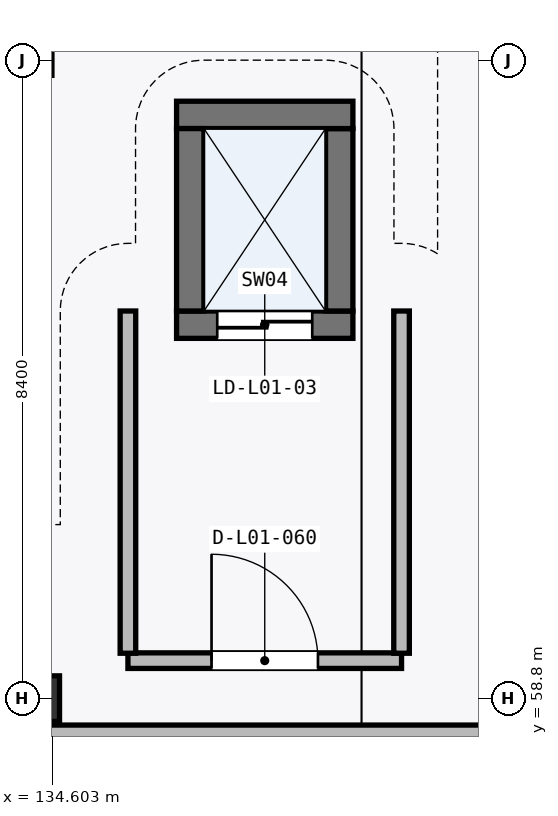
"""IFC4 building model, lengths in metres.
Left out: names, types, materials, properties, quantities, classifications, styles, units other than length and angle.
Written with IfcOpenShell. Run it as: python <this file> out.ifc"""

import sys

from ifc_helpers import new_model, si_unit, direction, frame, frame_2d, origin, origin_2d, place, context, subcontext, project, spatial, rectangle, hollow_rectangle, extrude, element, fill, save


model = new_model("IFC4")
c1 = context("Model", 3, precision=1e-05, world=origin(), true_north=direction((0.0, 1.0)))
c2 = subcontext(c1, "Body", "Model", "MODEL_VIEW")
j1 = project(units=[si_unit("LENGTHUNIT", "METRE"), si_unit("PLANEANGLEUNIT", "RADIAN")], contexts=[c1])
p1 = place(None, origin())
s1 = spatial("IfcSite", under=j1, at=p1, CompositionType="ELEMENT")
p2 = place(p1, origin())
s2 = spatial("IfcBuilding", under=s1, at=p2, CompositionType="ELEMENT")
p3 = place(p2, origin())
s3 = spatial("IfcBuildingStorey", under=s2, at=p3, CompositionType="ELEMENT", Elevation=0.0)
p4 = place(p3, frame((134.4, 58.8, 0.0), z_axis=(0.0, 0.0, 1.0), x_axis=(1.0, 0.0, 0.0)))
e1 = element("IfcColumn", 1, at=p4, inside=s3, PredefinedType="COLUMN", context=c2, shape_type="SweptSolid", body=[
    extrude(hollow_rectangle(XDim=0.6, YDim=0.6, WallThickness=0.024, at=origin_2d()), origin(), (0.0, 0.0, 1.0), 6.0),
])
p5 = place(p3, frame((136.24, 63.72, 0.0), z_axis=(0.0, 0.0, 1.0), x_axis=(1.0, 0.0, 0.0)))
e2 = element("IfcWall", 2, at=p5, inside=s3, PredefinedType="SHEAR", context=c2, shape_type="SweptSolid", body=[
    extrude(rectangle(XDim=2.32, YDim=0.36, at=frame_2d((1.16, 0.0))), origin(), (0.0, 0.0, 1.0), 5.745),
])
p6 = place(p5, frame((0.535, 0.0, 0.0)))
e3 = element("IfcOpeningElement", 3, at=p6, cuts=e2, PredefinedType="OPENING", context=c2, shape_type="SweptSolid", body=[
    extrude(rectangle(XDim=1.25, YDim=2.2, at=frame_2d((0.625, 1.1))), frame((0.0, 0.19, 0.0), z_axis=(0.0, -1.0, 0.0), x_axis=(1.0, 0.0, 0.0)), (0.0, 0.0, 1.0), 0.38),
])
p7 = place(p3, frame((138.38, 63.9, 0.0), z_axis=(0.0, 0.0, 1.0), x_axis=(0.0, 1.0, 0.0)))
e4 = element("IfcWall", 4, at=p7, inside=s3, PredefinedType="SHEAR", context=c2, shape_type="SweptSolid", body=[
    extrude(rectangle(XDim=2.4, YDim=0.36, at=frame_2d((1.2, 0.0))), origin(), (0.0, 0.0, 1.0), 5.745),
])
p8 = place(p3, frame((138.56, 66.48, 0.0), z_axis=(0.0, 0.0, 1.0), x_axis=(-1.0, 0.0, 0.0)))
e5 = element("IfcWall", 5, at=p8, inside=s3, PredefinedType="SHEAR", context=c2, shape_type="SweptSolid", body=[
    extrude(rectangle(XDim=2.32, YDim=0.36, at=frame_2d((1.16, 0.0))), origin(), (0.0, 0.0, 1.0), 5.745),
])
p9 = place(p3, frame((136.42, 66.3, 0.0), z_axis=(0.0, 0.0, 1.0), x_axis=(0.0, -1.0, 0.0)))
e6 = element("IfcWall", 6, at=p9, inside=s3, PredefinedType="SHEAR", context=c2, shape_type="SweptSolid", body=[
    extrude(rectangle(XDim=2.4, YDim=0.36, at=frame_2d((1.2, 0.0))), origin(), (0.0, 0.0, 1.0), 5.745),
])
p10 = place(p3, frame((135.6, 59.3, 0.0), z_axis=(0.0, 0.0, 1.0), x_axis=(1.0, 0.0, 0.0)))
e7 = element("IfcWall", 7, at=p10, inside=s3, PredefinedType="PARTITIONING", context=c2, shape_type="SweptSolid", body=[
    extrude(rectangle(XDim=3.6, YDim=0.205, at=frame_2d((1.8, 0.0))), origin(), (0.0, 0.0, 1.0), 5.745),
])
p11 = place(p10, frame((1.1, 0.0, 0.0)))
e8 = element("IfcOpeningElement", 8, at=p11, cuts=e7, PredefinedType="OPENING", context=c2, shape_type="SweptSolid", body=[
    extrude(rectangle(XDim=1.4, YDim=2.15, at=frame_2d((0.7, 1.075))), frame((0.0, 0.113, 0.0), z_axis=(0.0, -1.0, 0.0), x_axis=(1.0, 0.0, 0.0)), (0.0, 0.0, 1.0), 0.225),
])
for number, where, z_axis, x_axis in (
    (9, (139.2, 59.397, 0.0), (0.0, 0.0, 1.0), (0.0, 1.0, 0.0)),
    (10, (135.6, 63.9, 0.0), (0.0, 0.0, 1.0), (0.0, -1.0, 0.0)),
):
    element("IfcWall", number, at=place(p3, frame(where, z_axis=z_axis, x_axis=x_axis)), inside=s3, PredefinedType="PARTITIONING", context=c2, shape_type="SweptSolid", body=[
        extrude(rectangle(XDim=4.502, YDim=0.205, at=frame_2d((2.251, 0.0))), origin(), (0.0, 0.0, 1.0), 5.745),
    ])
p12 = place(p3, frame((144.0, 58.35, 0.0), z_axis=(0.0, 0.0, 1.0), x_axis=(-1.0, 0.0, 0.0)))
e11 = element("IfcWall", 11, at=p12, inside=s3, PredefinedType="PARTITIONING", context=c2, shape_type="SweptSolid", body=[
    extrude(rectangle(XDim=17.8, YDim=0.205, at=frame_2d((8.9, 0.0))), origin(), (0.0, 0.0, 1.0), 5.745),
])
p13 = place(p6, frame((1.25, 0.0, 0.0), z_axis=(0.0, 0.0, 1.0), x_axis=(-1.0, 0.0, 0.0)))
e12 = element("IfcDoor", 12, at=p13, inside=s3, OperationType="DOUBLE_DOOR_SLIDING", PredefinedType="DOOR", context=c2, shape_type="SweptSolid", body=[
    extrude(rectangle(XDim=1.25, YDim=2.2, at=frame_2d((0.625, 1.1))), frame((0.0, 0.025, 0.0), z_axis=(0.0, -1.0, 0.0), x_axis=(1.0, 0.0, 0.0)), (0.0, 0.0, 1.0), 0.05),
])
fill(e3, e12)
p14 = place(p11, origin())
e13 = element("IfcDoor", 13, at=p14, inside=s3, OperationType="SINGLE_SWING_LEFT", PredefinedType="DOOR", context=c2, shape_type="SweptSolid", body=[
    extrude(rectangle(XDim=1.4, YDim=2.15, at=frame_2d((0.7, 1.075))), frame((0.0, 0.025, 0.0), z_axis=(0.0, -1.0, 0.0), x_axis=(1.0, 0.0, 0.0)), (0.0, 0.0, 1.0), 0.05),
])
fill(e8, e13)
save(model, sys.argv[1])
